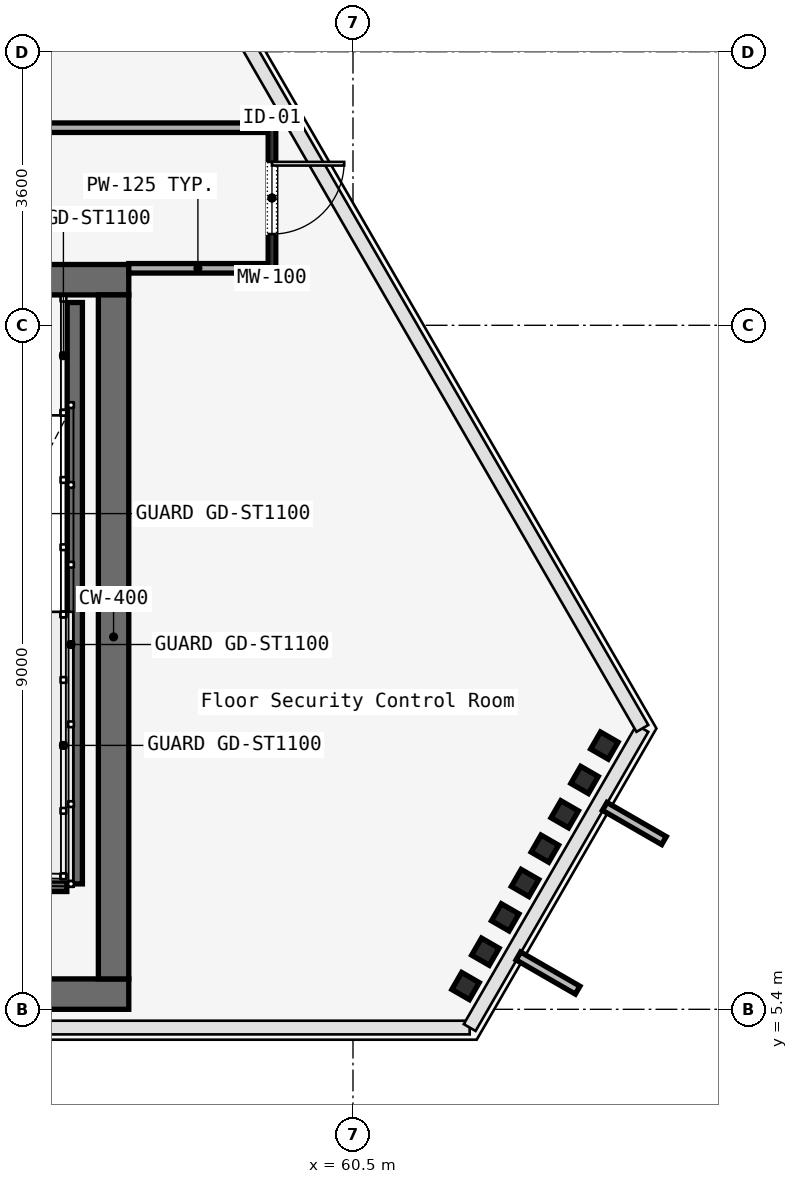
"""IFC4 building model, lengths in metres.
Left out: names, types, materials, properties, quantities, classifications, styles, units other than length and angle.
Written with IfcOpenShell. Run it as: python <this file> out.ifc"""

import sys

from ifc_helpers import new_model, si_unit, direction, frame, frame_2d, origin, origin_2d, place, context, subcontext, project, spatial, rectangle, i_section, extrude, element, fill, save


model = new_model("IFC4")
c1 = context("Model", 3, precision=1e-05, world=origin(), true_north=direction((0.0, 1.0)))
c2 = subcontext(c1, "Body", "Model", "MODEL_VIEW")
j1 = project(units=[si_unit("LENGTHUNIT", "METRE"), si_unit("PLANEANGLEUNIT", "RADIAN")], contexts=[c1])
p1 = place(None, origin())
s1 = spatial("IfcSite", under=j1, at=p1, CompositionType="ELEMENT")
p2 = place(p1, origin())
s2 = spatial("IfcBuilding", under=s1, at=p2, CompositionType="ELEMENT")
p3 = place(p2, frame((0.0, 0.0, 283.3)))
s3 = spatial("IfcBuildingStorey", under=s2, at=p3, CompositionType="ELEMENT", Elevation=283.3)
p4 = place(p3, frame((26.45, 15.0, 0.0), z_axis=(0.0, 0.0, 1.0), x_axis=(1.0, 0.0, 0.0)))
e1 = element("IfcWall", 1, at=p4, inside=s3, PredefinedType="SOLIDWALL", context=c2, shape_type="SweptSolid", body=[
    extrude(rectangle(XDim=31.1, YDim=0.4, at=frame_2d((15.55, 0.0))), origin(), (0.0, 0.0, 1.0), 3.58),
])
p5 = place(p4, frame((1.65, 0.0, 0.0)))
e2 = element("IfcOpeningElement", 2, at=p5, cuts=e1, PredefinedType="OPENING", context=c2, shape_type="SweptSolid", body=[
    extrude(rectangle(XDim=1.1, YDim=2.2, at=frame_2d((0.55, 1.1))), frame((0.0, 0.2, 0.0), z_axis=(0.0, -1.0, 0.0), x_axis=(1.0, 0.0, 0.0)), (0.0, 0.0, 1.0), 0.4),
])
p6 = place(p4, frame((13.65, 0.0, 0.0)))
e3 = element("IfcOpeningElement", 3, at=p6, cuts=e1, PredefinedType="OPENING", context=c2, shape_type="SweptSolid", body=[
    extrude(rectangle(XDim=1.1, YDim=2.2, at=frame_2d((0.55, 1.1))), frame((0.0, 0.2, 0.0), z_axis=(0.0, -1.0, 0.0), x_axis=(1.0, 0.0, 0.0)), (0.0, 0.0, 1.0), 0.4),
])
p7 = place(p4, frame((25.55, 0.0, 0.0)))
e4 = element("IfcOpeningElement", 4, at=p7, cuts=e1, PredefinedType="OPENING", context=c2, shape_type="SweptSolid", body=[
    extrude(rectangle(XDim=1.1, YDim=2.2, at=frame_2d((0.55, 1.1))), frame((0.0, 0.2, 0.0), z_axis=(0.0, -1.0, 0.0), x_axis=(1.0, 0.0, 0.0)), (0.0, 0.0, 1.0), 0.4),
])
p8 = place(p4, frame((19.35, 0.0, 0.0)))
e5 = element("IfcOpeningElement", 5, at=p8, cuts=e1, PredefinedType="OPENING", context=c2, shape_type="SweptSolid", body=[
    extrude(rectangle(XDim=1.1, YDim=2.2, at=frame_2d((0.55, 1.1))), frame((0.0, 0.2, 0.0), z_axis=(0.0, -1.0, 0.0), x_axis=(1.0, 0.0, 0.0)), (0.0, 0.0, 1.0), 0.4),
])
p9 = place(p4, frame((21.4, 0.0, 0.0)))
e6 = element("IfcOpeningElement", 6, at=p9, cuts=e1, PredefinedType="OPENING", context=c2, shape_type="SweptSolid", body=[
    extrude(rectangle(XDim=0.9, YDim=2.1, at=frame_2d((0.45, 1.05))), frame((0.0, 0.2, 0.0), z_axis=(0.0, -1.0, 0.0), x_axis=(1.0, 0.0, 0.0)), (0.0, 0.0, 1.0), 0.4),
])
p10 = place(p4, frame((6.54, 0.0, 0.0)))
e7 = element("IfcOpeningElement", 7, at=p10, cuts=e1, PredefinedType="OPENING", context=c2, shape_type="SweptSolid", body=[
    extrude(rectangle(XDim=0.95, YDim=2.2, at=frame_2d((0.475, 1.1))), frame((0.0, 0.2, 0.0), z_axis=(0.0, -1.0, 0.0), x_axis=(1.0, 0.0, 0.0)), (0.0, 0.0, 1.0), 0.4),
])
p11 = place(p4, frame((10.49, 0.0, 0.0)))
e8 = element("IfcOpeningElement", 8, at=p11, cuts=e1, PredefinedType="OPENING", context=c2, shape_type="SweptSolid", body=[
    extrude(rectangle(XDim=0.95, YDim=2.2, at=frame_2d((0.475, 1.1))), frame((0.0, 0.2, 0.0), z_axis=(0.0, -1.0, 0.0), x_axis=(1.0, 0.0, 0.0)), (0.0, 0.0, 1.0), 0.4),
])
p12 = place(p4, frame((23.35, 0.0, 0.0)))
e9 = element("IfcOpeningElement", 9, at=p12, cuts=e1, PredefinedType="OPENING", context=c2, shape_type="SweptSolid", body=[
    extrude(rectangle(XDim=1.3, YDim=2.3, at=frame_2d((0.65, 1.15))), frame((0.0, 0.2, 0.0), z_axis=(0.0, -1.0, 0.0), x_axis=(1.0, 0.0, 0.0)), (0.0, 0.0, 1.0), 0.4),
])
p13 = place(p3, frame((26.45, 5.6, 0.0), z_axis=(0.0, 0.0, 1.0), x_axis=(1.0, 0.0, 0.0)))
e10 = element("IfcWall", 10, at=p13, inside=s3, PredefinedType="SOLIDWALL", context=c2, shape_type="SweptSolid", body=[
    extrude(rectangle(XDim=31.1, YDim=0.4, at=frame_2d((15.55, 0.0))), origin(), (0.0, 0.0, 1.0), 3.58),
])
p14 = place(p3, frame((57.35, 5.8, 0.0), z_axis=(0.0, 0.0, 1.0), x_axis=(0.0, 1.0, 0.0)))
e11 = element("IfcWall", 11, at=p14, inside=s3, PredefinedType="SOLIDWALL", context=c2, shape_type="SweptSolid", body=[
    extrude(rectangle(XDim=9.0, YDim=0.4, at=frame_2d((4.5, 0.0))), origin(), (0.0, 0.0, 1.0), 3.58),
])
for number, where, z_axis, x_axis in (
    (12, (61.981, 5.706, 0.0), (0.0, 0.0, 1.0), (0.5, 0.866, 0.0)),
    (13, (62.242, 6.158, 0.0), (0.0, 0.0, 1.0), (0.5, 0.866, 0.0)),
    (14, (62.503, 6.61, 0.0), (0.0, 0.0, 1.0), (0.5, 0.866, 0.0)),
    (15, (62.764, 7.062, 0.0), (0.0, 0.0, 1.0), (0.5, 0.866, 0.0)),
    (16, (63.025, 7.514, 0.0), (0.0, 0.0, 1.0), (0.5, 0.866, 0.0)),
    (17, (63.286, 7.966, 0.0), (0.0, 0.0, 1.0), (0.5, 0.866, 0.0)),
    (18, (63.546, 8.418, 0.0), (0.0, 0.0, 1.0), (0.5, 0.866, 0.0)),
    (19, (63.807, 8.87, 0.0), (0.0, 0.0, 1.0), (0.5, 0.866, 0.0)),
):
    element("IfcColumn", number, at=place(p3, frame(where, z_axis=z_axis, x_axis=x_axis)), inside=s3, PredefinedType="COLUMN", context=c2, shape_type="SweptSolid", body=[
        extrude(i_section(OverallWidth=0.259, OverallDepth=0.267, WebThickness=0.013, FlangeThickness=0.021, FilletRadius=0.013, at=origin_2d()), origin(), (0.0, 0.0, 1.0), 3.58),
    ])
p15 = place(p3, frame((56.84, 14.7, 0.0), z_axis=(0.0, 0.0, 1.0), x_axis=(0.0, -1.0, 0.0)))
e20 = element("IfcWall", 20, at=p15, inside=s3, PredefinedType="SOLIDWALL", context=c2, shape_type="SweptSolid", body=[
    extrude(rectangle(XDim=7.65, YDim=0.2, at=frame_2d((3.825, 0.0))), origin(), (0.0, 0.0, 1.0), 3.8),
])
p16 = place(p3, frame((53.62, 7.05, 0.0), z_axis=(0.0, 0.0, 1.0), x_axis=(1.0, 0.0, 0.0)))
e21 = element("IfcWall", 21, at=p16, inside=s3, PredefinedType="SOLIDWALL", context=c2, shape_type="SweptSolid", body=[
    extrude(rectangle(XDim=3.115, YDim=0.2, at=frame_2d((1.558, 0.0))), origin(), (0.0, 0.0, 1.0), 3.8),
])
p17 = place(p3, frame((59.434, 17.0, 0.0), z_axis=(0.0, 0.0, 1.0), x_axis=(0.0, -1.0, 0.0)))
e22 = element("IfcWall", 22, at=p17, inside=s3, PredefinedType="MOVABLE", context=c2, shape_type="SweptSolid", body=[
    extrude(rectangle(XDim=1.85, YDim=0.1, at=frame_2d((0.925, 0.0))), origin(), (0.0, 0.0, 1.0), 3.01),
])
p18 = place(p17, frame((0.45, 0.0, 0.0)))
e23 = element("IfcOpeningElement", 23, at=p18, cuts=e22, PredefinedType="OPENING", context=c2, shape_type="SweptSolid", body=[
    extrude(rectangle(XDim=0.95, YDim=2.2, at=frame_2d((0.475, 1.1))), frame((0.0, 0.05, 0.0), z_axis=(0.0, -1.0, 0.0), x_axis=(1.0, 0.0, 0.0)), (0.0, 0.0, 1.0), 0.1),
])
p19 = place(p3, frame((59.369, 15.15, 0.0), z_axis=(0.0, 0.0, 1.0), x_axis=(-1.0, 0.0, 0.0)))
e24 = element("IfcWall", 24, at=p19, inside=s3, PredefinedType="PARTITIONING", context=c2, shape_type="SweptSolid", body=[
    extrude(rectangle(XDim=1.819, YDim=0.125, at=frame_2d((0.909, 0.0))), origin(), (0.0, 0.0, 1.0), 3.01),
])
p20 = place(p3, frame((50.2, 17.0, 0.0), z_axis=(0.0, 0.0, 1.0), x_axis=(1.0, 0.0, 0.0)))
e25 = element("IfcWall", 25, at=p20, inside=s3, PredefinedType="PARTITIONING", context=c2, shape_type="SweptSolid", body=[
    extrude(rectangle(XDim=9.169, YDim=0.125, at=frame_2d((4.584, 0.0))), origin(), (0.0, 0.0, 1.0), 3.01),
])
p21 = place(p20, frame((4.11, 0.0, 0.0)))
e26 = element("IfcOpeningElement", 26, at=p21, cuts=e25, PredefinedType="OPENING", context=c2, shape_type="SweptSolid", body=[
    extrude(rectangle(XDim=0.95, YDim=2.2, at=frame_2d((0.475, 1.1))), frame((0.0, 0.062, 0.0), z_axis=(0.0, -1.0, 0.0), x_axis=(1.0, 0.0, 0.0)), (0.0, 0.0, 1.0), 0.125),
])
p22 = place(p18, origin())
e27 = element("IfcDoor", 27, at=p22, inside=s3, OperationType="SINGLE_SWING_LEFT", PredefinedType="DOOR", context=c2, shape_type="SweptSolid", body=[
    extrude(rectangle(XDim=0.95, YDim=2.2, at=frame_2d((0.475, 1.1))), frame((0.0, 0.025, 0.0), z_axis=(0.0, -1.0, 0.0), x_axis=(1.0, 0.0, 0.0)), (0.0, 0.0, 1.0), 0.05),
])
fill(e23, e27)
save(model, sys.argv[1])
